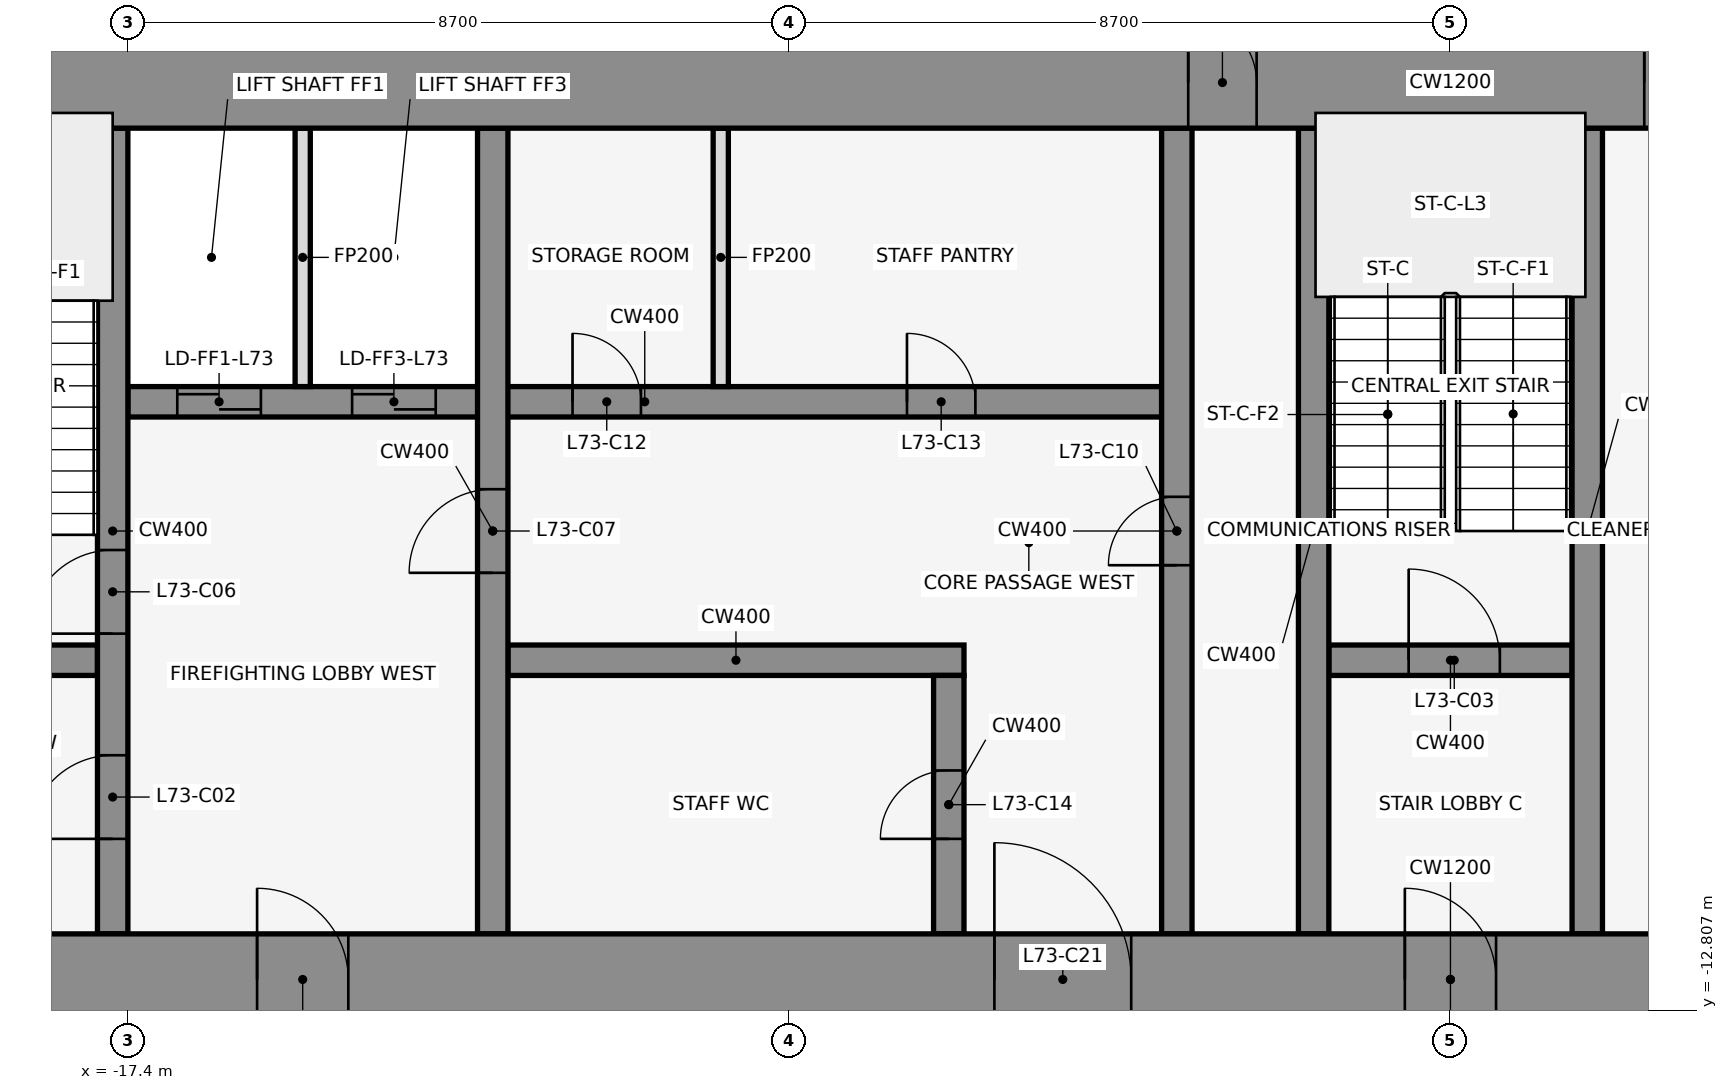
"""IFC4 building model, lengths in metres.
Left out: names, types, materials, properties, quantities, classifications, styles, units other than length and angle.
Written with IfcOpenShell. Run it as: python <this file> out.ifc"""

import sys

from ifc_helpers import new_model, si_unit, direction, frame, frame_2d, origin, place, context, subcontext, project, spatial, rectangle, extrude, element, fill, save


model = new_model("IFC4")
c1 = context("Model", 3, precision=1e-05, world=origin(), true_north=direction((0.0, 1.0)))
c2 = subcontext(c1, "Body", "Model", "MODEL_VIEW")
j1 = project(units=[si_unit("LENGTHUNIT", "METRE"), si_unit("PLANEANGLEUNIT", "RADIAN")], contexts=[c1])
p1 = place(None, origin())
s1 = spatial("IfcSite", under=j1, at=p1, CompositionType="ELEMENT")
p2 = place(p1, origin())
s2 = spatial("IfcBuilding", under=s1, at=p2, CompositionType="ELEMENT")
p3 = place(p2, frame((0.0, 0.0, 324.5)))
s3 = spatial("IfcBuildingStorey", under=s2, at=p3, CompositionType="ELEMENT", Elevation=324.5)
for number, where, z_axis, x_axis in (
    (1, (1.901, 1.08, 0.0), (0.0, 0.0, 1.0), (-0.84, -0.543, 0.0)),
    (2, (-0.068, -0.105, 0.0), (0.0, 0.0, 1.0), (-0.84, 0.543, 0.0)),
    (3, (-14.599, 1.08, 0.0), (0.0, 0.0, 1.0), (-0.84, -0.543, 0.0)),
):
    element("IfcWall", number, at=place(p3, frame(where, z_axis=z_axis, x_axis=x_axis)), inside=s3, PredefinedType="STANDARD", context=c2, shape_type="SweptSolid", body=[
        extrude(rectangle(XDim=2.183, YDim=0.25, at=frame_2d((1.091, 0.0))), origin(), (0.0, 0.0, 1.0), 4.35),
    ])
p4 = place(p3, frame((-20.8, -8.2, 0.0), z_axis=(0.0, 0.0, 1.0), x_axis=(1.0, 0.0, 0.0)))
e4 = element("IfcWall", 4, at=p4, inside=s3, PredefinedType="SHEAR", context=c2, shape_type="SweptSolid", body=[
    extrude(rectangle(XDim=3.0, YDim=0.4, at=frame_2d((1.5, 0.0))), origin(), (0.0, 0.0, 1.0), 4.5),
])
p5 = place(p4, frame((0.85, 0.0, 0.0)))
e5 = element("IfcOpeningElement", 5, at=p5, cuts=e4, PredefinedType="OPENING", context=c2, shape_type="SweptSolid", body=[
    extrude(rectangle(XDim=1.2, YDim=2.1, at=frame_2d((0.6, 1.05))), frame((0.0, 0.212, 0.0), z_axis=(0.0, -1.0, 0.0), x_axis=(1.0, 0.0, 0.0)), (0.0, 0.0, 1.0), 0.424),
])
p6 = place(p3, frame((-12.4, -8.2, 0.0), z_axis=(0.0, 0.0, 1.0), x_axis=(1.0, 0.0, 0.0)))
e6 = element("IfcWall", 6, at=p6, inside=s3, PredefinedType="SHEAR", context=c2, shape_type="SweptSolid", body=[
    extrude(rectangle(XDim=6.0, YDim=0.4, at=frame_2d((3.0, 0.0))), origin(), (0.0, 0.0, 1.0), 4.5),
])
p7 = place(p3, frame((-1.6, -8.2, 0.0), z_axis=(0.0, 0.0, 1.0), x_axis=(1.0, 0.0, 0.0)))
e7 = element("IfcWall", 7, at=p7, inside=s3, PredefinedType="SHEAR", context=c2, shape_type="SweptSolid", body=[
    extrude(rectangle(XDim=3.2, YDim=0.4, at=frame_2d((1.6, 0.0))), origin(), (0.0, 0.0, 1.0), 4.5),
])
p8 = place(p7, frame((1.05, 0.0, 0.0)))
e8 = element("IfcOpeningElement", 8, at=p8, cuts=e7, PredefinedType="OPENING", context=c2, shape_type="SweptSolid", body=[
    extrude(rectangle(XDim=1.2, YDim=2.1, at=frame_2d((0.6, 1.05))), frame((0.0, 0.212, 0.0), z_axis=(0.0, -1.0, 0.0), x_axis=(1.0, 0.0, 0.0)), (0.0, 0.0, 1.0), 0.424),
])
p9 = place(p3, frame((-17.4, -4.8, 0.0), z_axis=(0.0, 0.0, 1.0), x_axis=(1.0, 0.0, 0.0)))
e9 = element("IfcWall", 9, at=p9, inside=s3, PredefinedType="SHEAR", context=c2, shape_type="SweptSolid", body=[
    extrude(rectangle(XDim=13.6, YDim=0.4, at=frame_2d((6.8, 0.0))), origin(), (0.0, 0.0, 1.0), 4.5),
])
p10 = place(p9, frame((0.65, 0.0, 0.0)))
e10 = element("IfcOpeningElement", 10, at=p10, cuts=e9, PredefinedType="OPENING", context=c2, shape_type="SweptSolid", body=[
    extrude(rectangle(XDim=1.1, YDim=2.1, at=frame_2d((0.55, 1.05))), frame((0.0, 0.212, 0.0), z_axis=(0.0, -1.0, 0.0), x_axis=(1.0, 0.0, 0.0)), (0.0, 0.0, 1.0), 0.424),
])
p11 = place(p9, frame((2.95, 0.0, 0.0)))
e11 = element("IfcOpeningElement", 11, at=p11, cuts=e9, PredefinedType="OPENING", context=c2, shape_type="SweptSolid", body=[
    extrude(rectangle(XDim=1.1, YDim=2.1, at=frame_2d((0.55, 1.05))), frame((0.0, 0.212, 0.0), z_axis=(0.0, -1.0, 0.0), x_axis=(1.0, 0.0, 0.0)), (0.0, 0.0, 1.0), 0.424),
])
p12 = place(p9, frame((5.85, 0.0, 0.0)))
e12 = element("IfcOpeningElement", 12, at=p12, cuts=e9, PredefinedType="OPENING", context=c2, shape_type="SweptSolid", body=[
    extrude(rectangle(XDim=0.9, YDim=2.1, at=frame_2d((0.45, 1.05))), frame((0.0, 0.212, 0.0), z_axis=(0.0, -1.0, 0.0), x_axis=(1.0, 0.0, 0.0)), (0.0, 0.0, 1.0), 0.424),
])
p13 = place(p9, frame((10.25, 0.0, 0.0)))
e13 = element("IfcOpeningElement", 13, at=p13, cuts=e9, PredefinedType="OPENING", context=c2, shape_type="SweptSolid", body=[
    extrude(rectangle(XDim=0.9, YDim=2.1, at=frame_2d((0.45, 1.05))), frame((0.0, 0.212, 0.0), z_axis=(0.0, -1.0, 0.0), x_axis=(1.0, 0.0, 0.0)), (0.0, 0.0, 1.0), 0.424),
])
p14 = place(p3, frame((-17.6, -11.8, 0.0), z_axis=(0.0, 0.0, 1.0), x_axis=(0.0, 1.0, 0.0)))
e14 = element("IfcWall", 14, at=p14, inside=s3, PredefinedType="SHEAR", context=c2, shape_type="SweptSolid", body=[
    extrude(rectangle(XDim=10.6, YDim=0.4, at=frame_2d((5.3, 0.0))), origin(), (0.0, 0.0, 1.0), 4.5),
])
p15 = place(p14, frame((1.25, 0.0, 0.0)))
e15 = element("IfcOpeningElement", 15, at=p15, cuts=e14, PredefinedType="OPENING", context=c2, shape_type="SweptSolid", body=[
    extrude(rectangle(XDim=1.1, YDim=2.1, at=frame_2d((0.55, 1.05))), frame((0.0, 0.212, 0.0), z_axis=(0.0, -1.0, 0.0), x_axis=(1.0, 0.0, 0.0)), (0.0, 0.0, 1.0), 0.424),
])
p16 = place(p14, frame((3.95, 0.0, 0.0)))
e16 = element("IfcOpeningElement", 16, at=p16, cuts=e14, PredefinedType="OPENING", context=c2, shape_type="SweptSolid", body=[
    extrude(rectangle(XDim=1.1, YDim=2.1, at=frame_2d((0.55, 1.05))), frame((0.0, 0.212, 0.0), z_axis=(0.0, -1.0, 0.0), x_axis=(1.0, 0.0, 0.0)), (0.0, 0.0, 1.0), 0.424),
])
p17 = place(p3, frame((-15.1, -4.6, 0.0), z_axis=(0.0, 0.0, 1.0), x_axis=(0.0, 1.0, 0.0)))
e17 = element("IfcWall", 17, at=p17, inside=s3, PredefinedType="PARTITIONING", context=c2, shape_type="SweptSolid", body=[
    extrude(rectangle(XDim=3.4, YDim=0.2, at=frame_2d((1.7, 0.0))), origin(), (0.0, 0.0, 1.0), 3.418),
])
p18 = place(p3, frame((-12.6, -11.8, 0.0), z_axis=(0.0, 0.0, 1.0), x_axis=(0.0, 1.0, 0.0)))
e18 = element("IfcWall", 18, at=p18, inside=s3, PredefinedType="SHEAR", context=c2, shape_type="SweptSolid", body=[
    extrude(rectangle(XDim=10.6, YDim=0.4, at=frame_2d((5.3, 0.0))), origin(), (0.0, 0.0, 1.0), 4.5),
])
p19 = place(p18, frame((4.75, 0.0, 0.0)))
e19 = element("IfcOpeningElement", 19, at=p19, cuts=e18, PredefinedType="OPENING", context=c2, shape_type="SweptSolid", body=[
    extrude(rectangle(XDim=1.1, YDim=2.1, at=frame_2d((0.55, 1.05))), frame((0.0, 0.212, 0.0), z_axis=(0.0, -1.0, 0.0), x_axis=(1.0, 0.0, 0.0)), (0.0, 0.0, 1.0), 0.424),
])
p20 = place(p3, frame((-9.6, -4.6, 0.0), z_axis=(0.0, 0.0, 1.0), x_axis=(0.0, 1.0, 0.0)))
e20 = element("IfcWall", 20, at=p20, inside=s3, PredefinedType="PARTITIONING", context=c2, shape_type="SweptSolid", body=[
    extrude(rectangle(XDim=3.4, YDim=0.2, at=frame_2d((1.7, 0.0))), origin(), (0.0, 0.0, 1.0), 3.418),
])
p21 = place(p3, frame((-6.6, -11.8, 0.0), z_axis=(0.0, 0.0, 1.0), x_axis=(0.0, 1.0, 0.0)))
e21 = element("IfcWall", 21, at=p21, inside=s3, PredefinedType="SHEAR", context=c2, shape_type="SweptSolid", body=[
    extrude(rectangle(XDim=3.4, YDim=0.4, at=frame_2d((1.7, 0.0))), origin(), (0.0, 0.0, 1.0), 4.5),
])
p22 = place(p21, frame((1.25, 0.0, 0.0)))
e22 = element("IfcOpeningElement", 22, at=p22, cuts=e21, PredefinedType="OPENING", context=c2, shape_type="SweptSolid", body=[
    extrude(rectangle(XDim=0.9, YDim=2.1, at=frame_2d((0.45, 1.05))), frame((0.0, 0.212, 0.0), z_axis=(0.0, -1.0, 0.0), x_axis=(1.0, 0.0, 0.0)), (0.0, 0.0, 1.0), 0.424),
])
p23 = place(p3, frame((-3.6, -11.8, 0.0), z_axis=(0.0, 0.0, 1.0), x_axis=(0.0, 1.0, 0.0)))
e23 = element("IfcWall", 23, at=p23, inside=s3, PredefinedType="SHEAR", context=c2, shape_type="SweptSolid", body=[
    extrude(rectangle(XDim=10.6, YDim=0.4, at=frame_2d((5.3, 0.0))), origin(), (0.0, 0.0, 1.0), 4.5),
])
p24 = place(p23, frame((4.85, 0.0, 0.0)))
e24 = element("IfcOpeningElement", 24, at=p24, cuts=e23, PredefinedType="OPENING", context=c2, shape_type="SweptSolid", body=[
    extrude(rectangle(XDim=0.9, YDim=2.1, at=frame_2d((0.45, 1.05))), frame((0.0, 0.212, 0.0), z_axis=(0.0, -1.0, 0.0), x_axis=(1.0, 0.0, 0.0)), (0.0, 0.0, 1.0), 0.424),
])
for number, where, z_axis, x_axis in (
    (25, (-1.8, -11.8, 0.0), (0.0, 0.0, 1.0), (0.0, 1.0, 0.0)),
    (26, (1.8, -11.8, 0.0), (0.0, 0.0, 1.0), (0.0, 1.0, 0.0)),
):
    element("IfcWall", number, at=place(p3, frame(where, z_axis=z_axis, x_axis=x_axis)), inside=s3, PredefinedType="SHEAR", context=c2, shape_type="SweptSolid", body=[
        extrude(rectangle(XDim=10.6, YDim=0.4, at=frame_2d((5.3, 0.0))), origin(), (0.0, 0.0, 1.0), 4.5),
    ])
p25 = place(p3, frame((-22.0, -0.6, 0.0), z_axis=(0.0, 0.0, 1.0), x_axis=(1.0, 0.0, 0.0)))
e27 = element("IfcWall", 27, at=p25, inside=s3, PredefinedType="SHEAR", context=c2, shape_type="SweptSolid", body=[
    extrude(rectangle(XDim=44.0, YDim=1.2, at=frame_2d((22.0, 0.0))), origin(), (0.0, 0.0, 1.0), 4.5),
])
p26 = place(p25, frame((18.55, 0.0, 0.0)))
e28 = element("IfcOpeningElement", 28, at=p26, cuts=e27, PredefinedType="OPENING", context=c2, shape_type="SweptSolid", body=[
    extrude(rectangle(XDim=0.9, YDim=2.1, at=frame_2d((0.45, 1.05))), frame((0.0, 0.612, 0.0), z_axis=(0.0, -1.0, 0.0), x_axis=(1.0, 0.0, 0.0)), (0.0, 0.0, 1.0), 1.224),
])
p27 = place(p25, frame((24.55, 0.0, 0.0)))
e29 = element("IfcOpeningElement", 29, at=p27, cuts=e27, PredefinedType="OPENING", context=c2, shape_type="SweptSolid", body=[
    extrude(rectangle(XDim=0.9, YDim=2.1, at=frame_2d((0.45, 1.05))), frame((0.0, 0.612, 0.0), z_axis=(0.0, -1.0, 0.0), x_axis=(1.0, 0.0, 0.0)), (0.0, 0.0, 1.0), 1.224),
])
p28 = place(p3, frame((-22.0, -12.4, 0.0), z_axis=(0.0, 0.0, 1.0), x_axis=(1.0, 0.0, 0.0)))
e30 = element("IfcWall", 30, at=p28, inside=s3, PredefinedType="SHEAR", context=c2, shape_type="SweptSolid", body=[
    extrude(rectangle(XDim=44.0, YDim=1.2, at=frame_2d((22.0, 0.0))), origin(), (0.0, 0.0, 1.0), 4.5),
])
p29 = place(p28, frame((2.2, 0.0, 0.0)))
e31 = element("IfcOpeningElement", 31, at=p29, cuts=e30, PredefinedType="OPENING", context=c2, shape_type="SweptSolid", body=[
    extrude(rectangle(XDim=1.2, YDim=2.1, at=frame_2d((0.6, 1.05))), frame((0.0, 0.612, 0.0), z_axis=(0.0, -1.0, 0.0), x_axis=(1.0, 0.0, 0.0)), (0.0, 0.0, 1.0), 1.224),
])
p30 = place(p28, frame((21.4, 0.0, 0.0)))
e32 = element("IfcOpeningElement", 32, at=p30, cuts=e30, PredefinedType="OPENING", context=c2, shape_type="SweptSolid", body=[
    extrude(rectangle(XDim=1.2, YDim=2.1, at=frame_2d((0.6, 1.05))), frame((0.0, 0.612, 0.0), z_axis=(0.0, -1.0, 0.0), x_axis=(1.0, 0.0, 0.0)), (0.0, 0.0, 1.0), 1.224),
])
p31 = place(p28, frame((40.6, 0.0, 0.0)))
e33 = element("IfcOpeningElement", 33, at=p31, cuts=e30, PredefinedType="OPENING", context=c2, shape_type="SweptSolid", body=[
    extrude(rectangle(XDim=1.2, YDim=2.1, at=frame_2d((0.6, 1.05))), frame((0.0, 0.612, 0.0), z_axis=(0.0, -1.0, 0.0), x_axis=(1.0, 0.0, 0.0)), (0.0, 0.0, 1.0), 1.224),
])
p32 = place(p28, frame((16.0, 0.0, 0.0)))
e34 = element("IfcOpeningElement", 34, at=p32, cuts=e30, PredefinedType="OPENING", context=c2, shape_type="SweptSolid", body=[
    extrude(rectangle(XDim=1.8, YDim=2.1, at=frame_2d((0.9, 1.05))), frame((0.0, 0.612, 0.0), z_axis=(0.0, -1.0, 0.0), x_axis=(1.0, 0.0, 0.0)), (0.0, 0.0, 1.0), 1.224),
])
p33 = place(p28, frame((6.3, 0.0, 0.0)))
e35 = element("IfcOpeningElement", 35, at=p33, cuts=e30, PredefinedType="OPENING", context=c2, shape_type="SweptSolid", body=[
    extrude(rectangle(XDim=1.2, YDim=2.1, at=frame_2d((0.6, 1.05))), frame((0.0, 0.612, 0.0), z_axis=(0.0, -1.0, 0.0), x_axis=(1.0, 0.0, 0.0)), (0.0, 0.0, 1.0), 1.224),
])
p34 = place(p28, frame((26.2, 0.0, 0.0)))
e36 = element("IfcOpeningElement", 36, at=p34, cuts=e30, PredefinedType="OPENING", context=c2, shape_type="SweptSolid", body=[
    extrude(rectangle(XDim=1.8, YDim=2.1, at=frame_2d((0.9, 1.05))), frame((0.0, 0.612, 0.0), z_axis=(0.0, -1.0, 0.0), x_axis=(1.0, 0.0, 0.0)), (0.0, 0.0, 1.0), 1.224),
])
p35 = place(p28, frame((36.5, 0.0, 0.0)))
e37 = element("IfcOpeningElement", 37, at=p35, cuts=e30, PredefinedType="OPENING", context=c2, shape_type="SweptSolid", body=[
    extrude(rectangle(XDim=1.2, YDim=2.1, at=frame_2d((0.6, 1.05))), frame((0.0, 0.612, 0.0), z_axis=(0.0, -1.0, 0.0), x_axis=(1.0, 0.0, 0.0)), (0.0, 0.0, 1.0), 1.224),
])
p36 = place(p15, frame((1.1, 0.0, 0.0), z_axis=(0.0, 0.0, 1.0), x_axis=(-1.0, 0.0, 0.0)))
e38 = element("IfcDoor", 38, at=p36, inside=s3, OperationType="SINGLE_SWING_LEFT", PredefinedType="DOOR", context=c2, shape_type="SweptSolid", body=[
    extrude(rectangle(XDim=1.1, YDim=2.1, at=frame_2d((0.55, 1.05))), frame((0.0, 0.025, 0.0), z_axis=(0.0, -1.0, 0.0), x_axis=(1.0, 0.0, 0.0)), (0.0, 0.0, 1.0), 0.05),
])
fill(e15, e38)
p37 = place(p8, origin())
e39 = element("IfcDoor", 39, at=p37, inside=s3, OperationType="SINGLE_SWING_LEFT", PredefinedType="DOOR", context=c2, shape_type="SweptSolid", body=[
    extrude(rectangle(XDim=1.2, YDim=2.1, at=frame_2d((0.6, 1.05))), frame((0.0, 0.025, 0.0), z_axis=(0.0, -1.0, 0.0), x_axis=(1.0, 0.0, 0.0)), (0.0, 0.0, 1.0), 0.05),
])
fill(e8, e39)
p38 = place(p10, origin())
e40 = element("IfcDoor", 40, at=p38, inside=s3, OperationType="DOUBLE_DOOR_SLIDING", PredefinedType="DOOR", context=c2, shape_type="SweptSolid", body=[
    extrude(rectangle(XDim=1.1, YDim=2.1, at=frame_2d((0.55, 1.05))), frame((0.0, 0.025, 0.0), z_axis=(0.0, -1.0, 0.0), x_axis=(1.0, 0.0, 0.0)), (0.0, 0.0, 1.0), 0.05),
])
fill(e10, e40)
p39 = place(p11, origin())
e41 = element("IfcDoor", 41, at=p39, inside=s3, OperationType="DOUBLE_DOOR_SLIDING", PredefinedType="DOOR", context=c2, shape_type="SweptSolid", body=[
    extrude(rectangle(XDim=1.1, YDim=2.1, at=frame_2d((0.55, 1.05))), frame((0.0, 0.025, 0.0), z_axis=(0.0, -1.0, 0.0), x_axis=(1.0, 0.0, 0.0)), (0.0, 0.0, 1.0), 0.05),
])
fill(e11, e41)
p40 = place(p16, frame((1.1, 0.0, 0.0), z_axis=(0.0, 0.0, 1.0), x_axis=(-1.0, 0.0, 0.0)))
e42 = element("IfcDoor", 42, at=p40, inside=s3, OperationType="SINGLE_SWING_LEFT", PredefinedType="DOOR", context=c2, shape_type="SweptSolid", body=[
    extrude(rectangle(XDim=1.1, YDim=2.1, at=frame_2d((0.55, 1.05))), frame((0.0, 0.025, 0.0), z_axis=(0.0, -1.0, 0.0), x_axis=(1.0, 0.0, 0.0)), (0.0, 0.0, 1.0), 0.05),
])
fill(e16, e42)
p41 = place(p19, origin())
e43 = element("IfcDoor", 43, at=p41, inside=s3, OperationType="SINGLE_SWING_LEFT", PredefinedType="DOOR", context=c2, shape_type="SweptSolid", body=[
    extrude(rectangle(XDim=1.1, YDim=2.1, at=frame_2d((0.55, 1.05))), frame((0.0, 0.025, 0.0), z_axis=(0.0, -1.0, 0.0), x_axis=(1.0, 0.0, 0.0)), (0.0, 0.0, 1.0), 0.05),
])
fill(e19, e43)
p42 = place(p24, frame((0.9, 0.0, 0.0), z_axis=(0.0, 0.0, 1.0), x_axis=(-1.0, 0.0, 0.0)))
e44 = element("IfcDoor", 44, at=p42, inside=s3, OperationType="SINGLE_SWING_LEFT", PredefinedType="DOOR", context=c2, shape_type="SweptSolid", body=[
    extrude(rectangle(XDim=0.9, YDim=2.1, at=frame_2d((0.45, 1.05))), frame((0.0, 0.025, 0.0), z_axis=(0.0, -1.0, 0.0), x_axis=(1.0, 0.0, 0.0)), (0.0, 0.0, 1.0), 0.05),
])
fill(e24, e44)
p43 = place(p12, origin())
e45 = element("IfcDoor", 45, at=p43, inside=s3, OperationType="SINGLE_SWING_RIGHT", PredefinedType="DOOR", context=c2, shape_type="SweptSolid", body=[
    extrude(rectangle(XDim=0.9, YDim=2.1, at=frame_2d((0.45, 1.05))), frame((0.0, 0.025, 0.0), z_axis=(0.0, -1.0, 0.0), x_axis=(1.0, 0.0, 0.0)), (0.0, 0.0, 1.0), 0.05),
])
fill(e12, e45)
p44 = place(p13, origin())
e46 = element("IfcDoor", 46, at=p44, inside=s3, OperationType="SINGLE_SWING_LEFT", PredefinedType="DOOR", context=c2, shape_type="SweptSolid", body=[
    extrude(rectangle(XDim=0.9, YDim=2.1, at=frame_2d((0.45, 1.05))), frame((0.0, 0.025, 0.0), z_axis=(0.0, -1.0, 0.0), x_axis=(1.0, 0.0, 0.0)), (0.0, 0.0, 1.0), 0.05),
])
fill(e13, e46)
p45 = place(p22, origin())
e47 = element("IfcDoor", 47, at=p45, inside=s3, OperationType="SINGLE_SWING_RIGHT", PredefinedType="DOOR", context=c2, shape_type="SweptSolid", body=[
    extrude(rectangle(XDim=0.9, YDim=2.1, at=frame_2d((0.45, 1.05))), frame((0.0, 0.025, 0.0), z_axis=(0.0, -1.0, 0.0), x_axis=(1.0, 0.0, 0.0)), (0.0, 0.0, 1.0), 0.05),
])
fill(e22, e47)
p46 = place(p26, origin())
e48 = element("IfcDoor", 48, at=p46, inside=s3, OperationType="SINGLE_SWING_LEFT", PredefinedType="DOOR", context=c2, shape_type="SweptSolid", body=[
    extrude(rectangle(XDim=0.9, YDim=2.1, at=frame_2d((0.45, 1.05))), frame((0.0, 0.025, 0.0), z_axis=(0.0, -1.0, 0.0), x_axis=(1.0, 0.0, 0.0)), (0.0, 0.0, 1.0), 0.05),
])
fill(e28, e48)
p47 = place(p27, origin())
e49 = element("IfcDoor", 49, at=p47, inside=s3, OperationType="SINGLE_SWING_LEFT", PredefinedType="DOOR", context=c2, shape_type="SweptSolid", body=[
    extrude(rectangle(XDim=0.9, YDim=2.1, at=frame_2d((0.45, 1.05))), frame((0.0, 0.025, 0.0), z_axis=(0.0, -1.0, 0.0), x_axis=(1.0, 0.0, 0.0)), (0.0, 0.0, 1.0), 0.05),
])
fill(e29, e49)
p48 = place(p30, frame((1.2, 0.0, 0.0), z_axis=(0.0, 0.0, 1.0), x_axis=(-1.0, 0.0, 0.0)))
e50 = element("IfcDoor", 50, at=p48, inside=s3, OperationType="SINGLE_SWING_RIGHT", PredefinedType="DOOR", context=c2, shape_type="SweptSolid", body=[
    extrude(rectangle(XDim=1.2, YDim=2.1, at=frame_2d((0.6, 1.05))), frame((0.0, 0.025, 0.0), z_axis=(0.0, -1.0, 0.0), x_axis=(1.0, 0.0, 0.0)), (0.0, 0.0, 1.0), 0.05),
])
fill(e32, e50)
p49 = place(p32, origin())
e51 = element("IfcDoor", 51, at=p49, inside=s3, OperationType="SINGLE_SWING_LEFT", PredefinedType="DOOR", context=c2, shape_type="SweptSolid", body=[
    extrude(rectangle(XDim=1.8, YDim=2.1, at=frame_2d((0.9, 1.05))), frame((0.0, 0.025, 0.0), z_axis=(0.0, -1.0, 0.0), x_axis=(1.0, 0.0, 0.0)), (0.0, 0.0, 1.0), 0.05),
])
fill(e34, e51)
p50 = place(p33, frame((1.2, 0.0, 0.0), z_axis=(0.0, 0.0, 1.0), x_axis=(-1.0, 0.0, 0.0)))
e52 = element("IfcDoor", 52, at=p50, inside=s3, OperationType="SINGLE_SWING_RIGHT", PredefinedType="DOOR", context=c2, shape_type="SweptSolid", body=[
    extrude(rectangle(XDim=1.2, YDim=2.1, at=frame_2d((0.6, 1.05))), frame((0.0, 0.025, 0.0), z_axis=(0.0, -1.0, 0.0), x_axis=(1.0, 0.0, 0.0)), (0.0, 0.0, 1.0), 0.05),
])
fill(e35, e52)
save(model, sys.argv[1])
